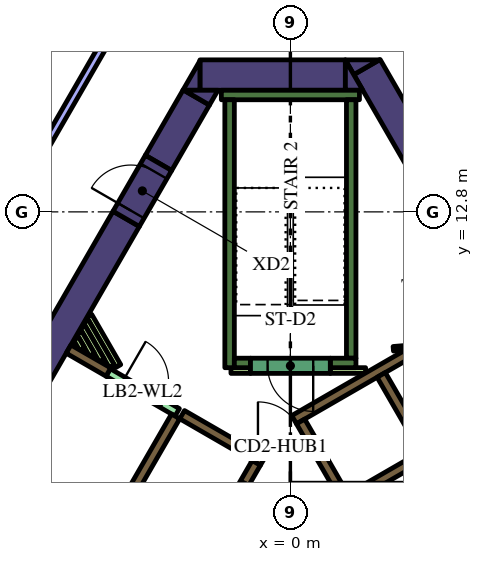
"""IFC4 building model, lengths in metres.
Left out: names, types, materials, properties, quantities, classifications, styles, units other than length and angle.
Written with IfcOpenShell. Run it as: python <this file> out.ifc"""

import sys

from ifc_helpers import new_model, si_unit, direction, frame, frame_2d, origin, place, context, subcontext, project, spatial, polyline, rectangle, outline, extrude, element, fill, save


model = new_model("IFC4")
c1 = context("Model", 3, precision=1e-05, world=origin(), true_north=direction((0.0, 1.0)))
c2 = subcontext(c1, "Body", "Model", "MODEL_VIEW")
j1 = project(units=[si_unit("LENGTHUNIT", "METRE"), si_unit("PLANEANGLEUNIT", "RADIAN")], contexts=[c1])
p1 = place(None, origin())
s1 = spatial("IfcSite", under=j1, at=p1, CompositionType="ELEMENT")
p2 = place(p1, origin())
s2 = spatial("IfcBuilding", under=s1, at=p2, CompositionType="ELEMENT")
p3 = place(p2, frame((0.0, 0.0, 192.0)))
s3 = spatial("IfcBuildingStorey", under=s2, at=p3, CompositionType="ELEMENT", Elevation=192.0)
p4 = place(p3, frame((8.279, 5.761, 0.0), z_axis=(0.0, 0.0, 1.0), x_axis=(-0.500010359015, 0.866019422922, 0.0)))
e1 = element("IfcWall", 1, at=p4, inside=s3, PredefinedType="SOLIDWALL", context=c2, shape_type="SweptSolid", body=[
    extrude(rectangle(XDim=12.528, YDim=0.8, at=frame_2d((6.264, 0.0))), origin(), (0.0, 0.0, 1.0), 4.2),
])
p5 = place(p3, origin())
e2 = element("IfcWall", 2, at=p5, inside=s3, PredefinedType="SOLIDWALL", context=c2, shape_type="SweptSolid", body=[
    extrude(outline(polyline([(1.443, 16.8), (2.339, 16.8), (1.667, 16.412), (1.443, 16.8)])), origin(), (0.0, 0.0, 1.0), 4.2),
])
p6 = place(p3, frame((-2.379, 16.4, 0.0), z_axis=(0.0, 0.0, 1.0), x_axis=(1.0, 0.0, 0.0)))
e3 = element("IfcWall", 3, at=p6, inside=s3, PredefinedType="SOLIDWALL", context=c2, shape_type="SweptSolid", body=[
    extrude(rectangle(XDim=3.824, YDim=0.8, at=frame_2d((1.912, 0.0))), origin(), (0.0, 0.0, 1.0), 4.2),
])
e4 = element("IfcWall", 4, at=p5, inside=s3, PredefinedType="SOLIDWALL", context=c2, shape_type="SweptSolid", body=[
    extrude(outline(polyline([(1.905, 16.0), (1.447, 16.0), (1.447, 16.793), (1.905, 16.0)])), origin(), (0.0, 0.0, 1.0), 4.2),
])
e5 = element("IfcWall", 5, at=p5, inside=s3, PredefinedType="SOLIDWALL", context=c2, shape_type="SweptSolid", body=[
    extrude(outline(polyline([(-2.829, 16.0), (-2.381, 16.776), (-2.381, 16.0), (-2.829, 16.0)])), origin(), (0.0, 0.0, 1.0), 4.2),
])
p7 = place(p3, frame((-2.477, 15.81, 0.0), z_axis=(0.0, 0.0, 1.0), x_axis=(-0.499903161488, -0.866081306307, 0.0)))
e6 = element("IfcWall", 6, at=p7, inside=s3, PredefinedType="SOLIDWALL", context=c2, shape_type="SweptSolid", body=[
    extrude(rectangle(XDim=1.988, YDim=0.8, at=frame_2d((0.994, 0.0))), origin(), (0.0, 0.0, 1.0), 4.2),
])
e7 = element("IfcWall", 7, at=p5, inside=s3, PredefinedType="SOLIDWALL", context=c2, shape_type="SweptSolid", body=[
    extrude(outline(polyline([(-1.905, 16.0), (-2.129, 15.612), (-2.801, 16.0), (-1.905, 16.0)])), origin(), (0.0, 0.0, 1.0), 4.2),
])
p8 = place(p3, frame((-4.321, 12.616, 0.0), z_axis=(0.0, 0.0, 1.0), x_axis=(-0.500009809857, -0.866019739987, 0.0)))
e8 = element("IfcWall", 8, at=p8, inside=s3, PredefinedType="SOLIDWALL", context=c2, shape_type="SweptSolid", body=[
    extrude(rectangle(XDim=16.695, YDim=0.8, at=frame_2d((8.347, 0.0))), origin(), (0.0, 0.0, 1.0), 4.2),
])
p9 = place(p3, frame((-1.817, 15.875, 0.0), z_axis=(0.0, 0.0, 1.0), x_axis=(1.0, 0.0, 0.0)))
e9 = element("IfcWall", 9, at=p9, inside=s3, PredefinedType="SOLIDWALL", context=c2, shape_type="SweptSolid", body=[
    extrude(rectangle(XDim=3.634, YDim=0.25, at=frame_2d((1.817, 0.0))), origin(), (0.0, 0.0, 1.0), 4.2),
])
p10 = place(p3, frame((1.6, 8.95, 0.0), z_axis=(0.0, 0.0, 1.0), x_axis=(0.0, 1.0, 0.0)))
e10 = element("IfcWall", 10, at=p10, inside=s3, PredefinedType="SOLIDWALL", context=c2, shape_type="SweptSolid", body=[
    extrude(rectangle(XDim=6.8, YDim=0.25, at=frame_2d((3.4, 0.0))), origin(), (0.0, 0.0, 1.0), 4.2),
])
p11 = place(p3, frame((1.05, 8.825, 0.0), z_axis=(0.0, 0.0, 1.0), x_axis=(1.0, 0.0, 0.0)))
e11 = element("IfcWall", 11, at=p11, inside=s3, PredefinedType="SOLIDWALL", context=c2, shape_type="SweptSolid", body=[
    extrude(rectangle(XDim=0.675, YDim=0.25, at=frame_2d((0.337, 0.0))), origin(), (0.0, 0.0, 1.0), 4.2),
])
p12 = place(p3, frame((-1.6, 8.7, 0.0), z_axis=(0.0, 0.0, 1.0), x_axis=(0.0, 1.0, 0.0)))
e12 = element("IfcWall", 12, at=p12, inside=s3, PredefinedType="SOLIDWALL", context=c2, shape_type="SweptSolid", body=[
    extrude(rectangle(XDim=7.05, YDim=0.25, at=frame_2d((3.525, 0.0))), origin(), (0.0, 0.0, 1.0), 4.2),
])
p13 = place(p3, frame((-1.475, 8.825, 0.0), z_axis=(0.0, 0.0, 1.0), x_axis=(1.0, 0.0, 0.0)))
e13 = element("IfcWall", 13, at=p13, inside=s3, PredefinedType="SOLIDWALL", context=c2, shape_type="SweptSolid", body=[
    extrude(rectangle(XDim=0.425, YDim=0.25, at=frame_2d((0.212, 0.0))), origin(), (0.0, 0.0, 1.0), 4.2),
])
p14 = place(p3, frame((3.1, 9.064, 0.0), z_axis=(0.0, 0.0, 1.0), x_axis=(-0.866033137035, -0.499986605379, 0.0)))
e14 = element("IfcWall", 14, at=p14, inside=s3, PredefinedType="SOLIDWALL", context=c2, shape_type="SweptSolid", body=[
    extrude(rectangle(XDim=3.467, YDim=0.25, at=frame_2d((1.733, 0.0))), origin(), (0.0, 0.0, 1.0), 4.2),
])
p15 = place(p3, frame((0.268, 7.285, 0.0), z_axis=(0.0, 0.0, 1.0), x_axis=(0.500098681536, -0.865968422476, 0.0)))
e15 = element("IfcWall", 15, at=p15, inside=s3, PredefinedType="SOLIDWALL", context=c2, shape_type="SweptSolid", body=[
    extrude(rectangle(XDim=0.636, YDim=0.25, at=frame_2d((0.318, 0.0))), origin(), (0.0, 0.0, 1.0), 4.2),
])
p16 = place(p3, frame((5.97, -2.591, 0.0), z_axis=(0.0, 0.0, 1.0), x_axis=(-0.499994469932, 0.866028596547, 0.0)))
e16 = element("IfcWall", 16, at=p16, inside=s3, PredefinedType="SOLIDWALL", context=c2, shape_type="SweptSolid", body=[
    extrude(rectangle(XDim=10.488, YDim=0.25, at=frame_2d((5.244, 0.0))), origin(), (0.0, 0.0, 1.0), 4.2),
])
p17 = place(p3, frame((1.574, 5.274, 0.0), z_axis=(0.0, 0.0, 1.0), x_axis=(0.866028486751, 0.499994660107, 0.0)))
e17 = element("IfcWall", 17, at=p17, inside=s3, PredefinedType="SOLIDWALL", context=c2, shape_type="SweptSolid", body=[
    extrude(rectangle(XDim=2.2, YDim=0.25, at=frame_2d((1.1, 0.0))), origin(), (0.0, 0.0, 1.0), 4.2),
])
p18 = place(p3, frame((-3.02, 7.419, 0.0), z_axis=(0.0, 0.0, 1.0), x_axis=(-0.500022956343, -0.866012149528, 0.0)))
e18 = element("IfcWall", 18, at=p18, inside=s3, PredefinedType="SOLIDWALL", context=c2, shape_type="SweptSolid", body=[
    extrude(rectangle(XDim=10.08, YDim=0.25, at=frame_2d((5.04, 0.0))), origin(), (0.0, 0.0, 1.0), 4.2),
])
e19 = element("IfcWall", 19, at=p5, inside=s3, PredefinedType="SOLIDWALL", context=c2, shape_type="SweptSolid", body=[
    extrude(outline(polyline([(-2.912, 7.356), (-2.787, 7.573), (-1.232, 6.675), (-1.303, 6.675), (-1.304, 6.675), (-1.304, 6.675), (-1.304, 6.525), (-1.304, 6.525), (-1.303, 6.525), (-0.971, 6.525), (-0.665, 6.348), (-0.79, 6.132), (-1.007, 6.257), (-1.007, 6.257), (-2.912, 7.356)])), origin(), (0.0, 0.0, 1.0), 4.2),
])
p19 = place(p3, frame((-5.837, 9.19, 0.0), z_axis=(0.0, 0.0, 1.0), x_axis=(0.866024298998, -0.500001913541, 0.0)))
e20 = element("IfcWall", 20, at=p19, inside=s3, PredefinedType="SOLIDWALL", context=c2, shape_type="SweptSolid", body=[
    extrude(rectangle(XDim=1.21, YDim=0.25, at=frame_2d((0.605, 0.0))), origin(), (0.0, 0.0, 1.0), 4.2),
])
p20 = place(p3, frame((-5.294, 10.067, 0.0), z_axis=(0.0, 0.0, 1.0), x_axis=(0.500054140411, -0.865994143547, 0.0)))
e21 = element("IfcWall", 21, at=p20, inside=s3, PredefinedType="PARTITIONING", context=c2, shape_type="SweptSolid", body=[
    extrude(rectangle(XDim=1.529, YDim=0.15, at=frame_2d((0.765, 0.0))), origin(), (0.0, 0.0, 1.0), 3.1),
])
p21 = place(p3, frame((-5.381, 9.917, 0.0), z_axis=(0.0, 0.0, 1.0), x_axis=(0.500136970483, -0.865946309396, 0.0)))
e22 = element("IfcWall", 22, at=p21, inside=s3, PredefinedType="PARTITIONING", context=c2, shape_type="SweptSolid", body=[
    extrude(rectangle(XDim=1.359, YDim=0.15, at=frame_2d((0.68, 0.0))), origin(), (0.0, 0.0, 1.0), 3.1),
])
p22 = place(p3, frame((-5.467, 9.767, 0.0), z_axis=(0.0, 0.0, 1.0), x_axis=(0.500168849293, -0.86592789665, 0.0)))
e23 = element("IfcWall", 23, at=p22, inside=s3, PredefinedType="PARTITIONING", context=c2, shape_type="SweptSolid", body=[
    extrude(rectangle(XDim=1.01, YDim=0.15, at=frame_2d((0.505, 0.0))), origin(), (0.0, 0.0, 1.0), 3.1),
])
p23 = place(p3, frame((-5.554, 9.617, 0.0), z_axis=(0.0, 0.0, 1.0), x_axis=(0.500253084543, -0.86587923604, 0.0)))
e24 = element("IfcWall", 24, at=p23, inside=s3, PredefinedType="PARTITIONING", context=c2, shape_type="SweptSolid", body=[
    extrude(rectangle(XDim=0.664, YDim=0.15, at=frame_2d((0.332, 0.0))), origin(), (0.0, 0.0, 1.0), 3.1),
])
p24 = place(p3, frame((-5.64, 9.467, 0.0), z_axis=(0.0, 0.0, 1.0), x_axis=(0.499944387978, -0.86605750902, 0.0)))
e25 = element("IfcWall", 25, at=p24, inside=s3, PredefinedType="PARTITIONING", context=c2, shape_type="SweptSolid", body=[
    extrude(rectangle(XDim=0.317, YDim=0.15, at=frame_2d((0.159, 0.0))), origin(), (0.0, 0.0, 1.0), 3.1),
])
p25 = place(p3, frame((1.05, 8.625, 0.0), z_axis=(0.0, 0.0, 1.0), x_axis=(1.0, 0.0, 0.0)))
e26 = element("IfcWall", 26, at=p25, inside=s3, PredefinedType="PARTITIONING", context=c2, shape_type="SweptSolid", body=[
    extrude(rectangle(XDim=0.929, YDim=0.15, at=frame_2d((0.464, 0.0))), origin(), (0.0, 0.0, 1.0), 3.1),
])
p26 = place(p3, frame((-1.564, 8.625, 0.0), z_axis=(0.0, 0.0, 1.0), x_axis=(1.0, 0.0, 0.0)))
e27 = element("IfcWall", 27, at=p26, inside=s3, PredefinedType="PARTITIONING", context=c2, shape_type="SweptSolid", body=[
    extrude(rectangle(XDim=0.514, YDim=0.15, at=frame_2d((0.257, 0.0))), origin(), (0.0, 0.0, 1.0), 3.1),
])
p27 = place(p3, frame((8.565, -2.185, 0.0), z_axis=(0.0, 0.0, 1.0), x_axis=(-0.499997954832, 0.866026584559, 0.0)))
e28 = element("IfcWall", 28, at=p27, inside=s3, PredefinedType="SOLIDWALL", context=c2, shape_type="SweptSolid", body=[
    extrude(rectangle(XDim=12.35, YDim=0.25, at=frame_2d((6.175, 0.0))), origin(), (0.0, 0.0, 1.0), 4.2),
])
p28 = place(p27, frame((0.585, 0.0, 0.0)))
e29 = element("IfcOpeningElement", 29, at=p28, cuts=e28, PredefinedType="OPENING", context=c2, shape_type="SweptSolid", body=[
    extrude(rectangle(XDim=1.1, YDim=2.1, at=frame_2d((0.55, 1.05))), frame((0.0, 0.135, 0.0), z_axis=(0.0, -1.0, 0.0), x_axis=(1.0, 0.0, 0.0)), (0.0, 0.0, 1.0), 0.27),
])
p29 = place(p3, frame((-0.898, 6.194, 0.0), z_axis=(0.0, 0.0, 1.0), x_axis=(-0.499996202215, -0.866027596426, 0.0)))
e30 = element("IfcWall", 30, at=p29, inside=s3, PredefinedType="SOLIDWALL", context=c2, shape_type="SweptSolid", body=[
    extrude(rectangle(XDim=9.83, YDim=0.25, at=frame_2d((4.915, 0.0))), origin(), (0.0, 0.0, 1.0), 4.2),
])
p30 = place(p29, frame((0.585, 0.0, 0.0)))
e31 = element("IfcOpeningElement", 31, at=p30, cuts=e30, PredefinedType="OPENING", context=c2, shape_type="SweptSolid", body=[
    extrude(rectangle(XDim=1.1, YDim=2.1, at=frame_2d((0.55, 1.05))), frame((0.0, 0.135, 0.0), z_axis=(0.0, -1.0, 0.0), x_axis=(1.0, 0.0, 0.0)), (0.0, 0.0, 1.0), 0.27),
])
p31 = place(p29, frame((3.105, 0.0, 0.0)))
e32 = element("IfcOpeningElement", 32, at=p31, cuts=e30, PredefinedType="OPENING", context=c2, shape_type="SweptSolid", body=[
    extrude(rectangle(XDim=1.1, YDim=2.1, at=frame_2d((0.55, 1.05))), frame((0.0, 0.135, 0.0), z_axis=(0.0, -1.0, 0.0), x_axis=(1.0, 0.0, 0.0)), (0.0, 0.0, 1.0), 0.27),
])
p32 = place(p29, frame((5.625, 0.0, 0.0)))
e33 = element("IfcOpeningElement", 33, at=p32, cuts=e30, PredefinedType="OPENING", context=c2, shape_type="SweptSolid", body=[
    extrude(rectangle(XDim=1.1, YDim=2.1, at=frame_2d((0.55, 1.05))), frame((0.0, 0.135, 0.0), z_axis=(0.0, -1.0, 0.0), x_axis=(1.0, 0.0, 0.0)), (0.0, 0.0, 1.0), 0.27),
])
p33 = place(p29, frame((8.145, 0.0, 0.0)))
e34 = element("IfcOpeningElement", 34, at=p33, cuts=e30, PredefinedType="OPENING", context=c2, shape_type="SweptSolid", body=[
    extrude(rectangle(XDim=1.1, YDim=2.1, at=frame_2d((0.55, 1.05))), frame((0.0, 0.135, 0.0), z_axis=(0.0, -1.0, 0.0), x_axis=(1.0, 0.0, 0.0)), (0.0, 0.0, 1.0), 0.27),
])
p34 = place(p3, frame((1.05, 8.75, 0.0), z_axis=(0.0, 0.0, 1.0), x_axis=(-1.0, 0.0, 0.0)))
e35 = element("IfcWall", 35, at=p34, inside=s3, PredefinedType="SOLIDWALL", context=c2, shape_type="SweptSolid", body=[
    extrude(rectangle(XDim=2.1, YDim=0.4, at=frame_2d((1.05, 0.0))), origin(), (0.0, 0.0, 1.0), 4.2),
])
p35 = place(p34, frame((0.45, 0.0, 0.0)))
e36 = element("IfcOpeningElement", 36, at=p35, cuts=e35, PredefinedType="OPENING", context=c2, shape_type="SweptSolid", body=[
    extrude(rectangle(XDim=1.2, YDim=2.1, at=frame_2d((0.6, 1.05))), frame((0.0, 0.21, 0.0), z_axis=(0.0, -1.0, 0.0), x_axis=(1.0, 0.0, 0.0)), (0.0, 0.0, 1.0), 0.42),
])
p36 = place(p3, frame((5.398, 9.419, 0.0), z_axis=(0.0, 0.0, 1.0), x_axis=(-0.996653416376, -0.081743303248, 0.0)))
e37 = element("IfcWall", 37, at=p36, inside=s3, PredefinedType="PARTITIONING", context=c2, shape_type="SweptSolid", body=[
    extrude(rectangle(XDim=2.7, YDim=0.12, at=frame_2d((1.35, 0.0))), origin(), (0.0, 0.0, 1.0), 3.1),
])
p37 = place(p36, frame((1.45, 0.0, 0.0)))
e38 = element("IfcOpeningElement", 38, at=p37, cuts=e37, PredefinedType="OPENING", context=c2, shape_type="SweptSolid", body=[
    extrude(rectangle(XDim=0.9, YDim=2.1, at=frame_2d((0.45, 1.05))), frame((0.0, 0.07, 0.0), z_axis=(0.0, -1.0, 0.0), x_axis=(1.0, 0.0, 0.0)), (0.0, 0.0, 1.0), 0.14),
])
p38 = place(p3, frame((-1.303, 6.6, 0.0), z_axis=(0.0, 0.0, 1.0), x_axis=(1.0, 0.0, 0.0)))
e39 = element("IfcWall", 39, at=p38, inside=s3, PredefinedType="PARTITIONING", context=c2, shape_type="SweptSolid", body=[
    extrude(rectangle(XDim=2.1, YDim=0.15, at=frame_2d((1.05, 0.0))), origin(), (0.0, 0.0, 1.0), 4.2),
])
p39 = place(p38, frame((0.45, 0.0, 0.0)))
e40 = element("IfcOpeningElement", 40, at=p39, cuts=e39, PredefinedType="OPENING", context=c2, shape_type="SweptSolid", body=[
    extrude(rectangle(XDim=1.2, YDim=2.1, at=frame_2d((0.6, 1.05))), frame((0.0, 0.085, 0.0), z_axis=(0.0, -1.0, 0.0), x_axis=(1.0, 0.0, 0.0)), (0.0, 0.0, 1.0), 0.17),
])
p40 = place(p3, frame((-4.796, 8.575, 0.0), z_axis=(0.0, 0.0, 1.0), x_axis=(0.866009402589, -0.500027713859, 0.0)))
e41 = element("IfcWall", 41, at=p40, inside=s3, PredefinedType="PARTITIONING", context=c2, shape_type="SweptSolid", body=[
    extrude(rectangle(XDim=2.1, YDim=0.226, at=frame_2d((1.05, 0.0))), origin(), (0.0, 0.0, 1.0), 3.1),
])
p41 = place(p40, frame((0.45, 0.0, 0.0)))
e42 = element("IfcOpeningElement", 42, at=p41, cuts=e41, PredefinedType="OPENING", context=c2, shape_type="SweptSolid", body=[
    extrude(rectangle(XDim=1.2, YDim=2.1, at=frame_2d((0.6, 1.05))), frame((0.0, 0.123, 0.0), z_axis=(0.0, -1.0, 0.0), x_axis=(1.0, 0.0, 0.0)), (0.0, 0.0, 1.0), 0.246),
])
p42 = place(p3, frame((-4.321, 12.616, 0.0), z_axis=(0.0, 0.0, 1.0), x_axis=(0.499892348375, 0.866087547558, 0.0)))
e43 = element("IfcWall", 43, at=p42, inside=s3, PredefinedType="SOLIDWALL", context=c2, shape_type="SweptSolid", body=[
    extrude(rectangle(XDim=1.7, YDim=0.8, at=frame_2d((0.85, 0.0))), origin(), (0.0, 0.0, 1.0), 4.2),
])
p43 = place(p42, frame((0.25, 0.0, 0.0)))
e44 = element("IfcOpeningElement", 44, at=p43, cuts=e43, PredefinedType="OPENING", context=c2, shape_type="SweptSolid", body=[
    extrude(rectangle(XDim=1.2, YDim=2.1, at=frame_2d((0.6, 1.05))), frame((0.0, 0.41, 0.0), z_axis=(0.0, -1.0, 0.0), x_axis=(1.0, 0.0, 0.0)), (0.0, 0.0, 1.0), 0.82),
])
p44 = place(p3, frame((-8.627, 16.173, 0.0), z_axis=(0.0, 0.0, 1.0), x_axis=(0.551896352686, 0.833912714792, 0.0)))
e45 = element("IfcWall", 45, at=p44, inside=s3, PredefinedType="PARTITIONING", context=c2, shape_type="SweptSolid", body=[
    extrude(rectangle(XDim=5.934, YDim=0.15, at=frame_2d((2.967, 0.0))), origin(), (0.0, 0.0, 1.0), 3.1),
])
p45 = place(p44, frame((2.534, 0.0, 0.0)))
e46 = element("IfcOpeningElement", 46, at=p45, cuts=e45, PredefinedType="OPENING", context=c2, shape_type="SweptSolid", body=[
    extrude(rectangle(XDim=0.9, YDim=2.1, at=frame_2d((0.45, 1.05))), frame((0.0, 0.085, 0.0), z_axis=(0.0, -1.0, 0.0), x_axis=(1.0, 0.0, 0.0)), (0.0, 0.0, 1.0), 0.17),
])
p46 = place(p3, frame((-3.768, 19.174, 0.0), z_axis=(0.0, 0.0, 1.0), x_axis=(-0.499985066967, -0.866034025203, 0.0)))
e47 = element("IfcWall", 47, at=p46, inside=s3, PredefinedType="PARTITIONING", context=c2, shape_type="SweptSolid", body=[
    extrude(rectangle(XDim=8.691, YDim=0.2, at=frame_2d((4.346, 0.0))), origin(), (0.0, 0.0, 1.0), 3.1),
])
p47 = place(p30, origin())
e48 = element("IfcDoor", 48, at=p47, inside=s3, OperationType="DOUBLE_DOOR_SLIDING", PredefinedType="DOOR", context=c2, shape_type="SweptSolid", body=[
    extrude(rectangle(XDim=1.1, YDim=2.1, at=frame_2d((0.55, 1.05))), frame((0.0, 0.025, 0.0), z_axis=(0.0, -1.0, 0.0), x_axis=(1.0, 0.0, 0.0)), (0.0, 0.0, 1.0), 0.05),
])
fill(e31, e48)
p48 = place(p35, origin())
e49 = element("IfcDoor", 49, at=p48, inside=s3, OperationType="SINGLE_SWING_LEFT", PredefinedType="DOOR", context=c2, shape_type="SweptSolid", body=[
    extrude(rectangle(XDim=1.2, YDim=2.1, at=frame_2d((0.6, 1.05))), frame((0.0, 0.025, 0.0), z_axis=(0.0, -1.0, 0.0), x_axis=(1.0, 0.0, 0.0)), (0.0, 0.0, 1.0), 0.05),
])
fill(e36, e49)
p49 = place(p39, origin())
e50 = element("IfcDoor", 50, at=p49, inside=s3, OperationType="SINGLE_SWING_LEFT", PredefinedType="DOOR", context=c2, shape_type="SweptSolid", body=[
    extrude(rectangle(XDim=1.2, YDim=2.1, at=frame_2d((0.6, 1.05))), frame((0.0, 0.025, 0.0), z_axis=(0.0, -1.0, 0.0), x_axis=(1.0, 0.0, 0.0)), (0.0, 0.0, 1.0), 0.05),
])
fill(e40, e50)
p50 = place(p41, origin())
e51 = element("IfcDoor", 51, at=p50, inside=s3, OperationType="SINGLE_SWING_LEFT", PredefinedType="DOOR", context=c2, shape_type="SweptSolid", body=[
    extrude(rectangle(XDim=1.2, YDim=2.1, at=frame_2d((0.6, 1.05))), frame((0.0, 0.025, 0.0), z_axis=(0.0, -1.0, 0.0), x_axis=(1.0, 0.0, 0.0)), (0.0, 0.0, 1.0), 0.05),
])
fill(e42, e51)
p51 = place(p43, origin())
e52 = element("IfcDoor", 52, at=p51, inside=s3, OperationType="SINGLE_SWING_LEFT", PredefinedType="DOOR", context=c2, shape_type="SweptSolid", body=[
    extrude(rectangle(XDim=1.2, YDim=2.1, at=frame_2d((0.6, 1.05))), frame((0.0, 0.025, 0.0), z_axis=(0.0, -1.0, 0.0), x_axis=(1.0, 0.0, 0.0)), (0.0, 0.0, 1.0), 0.05),
])
fill(e44, e52)
save(model, sys.argv[1])
